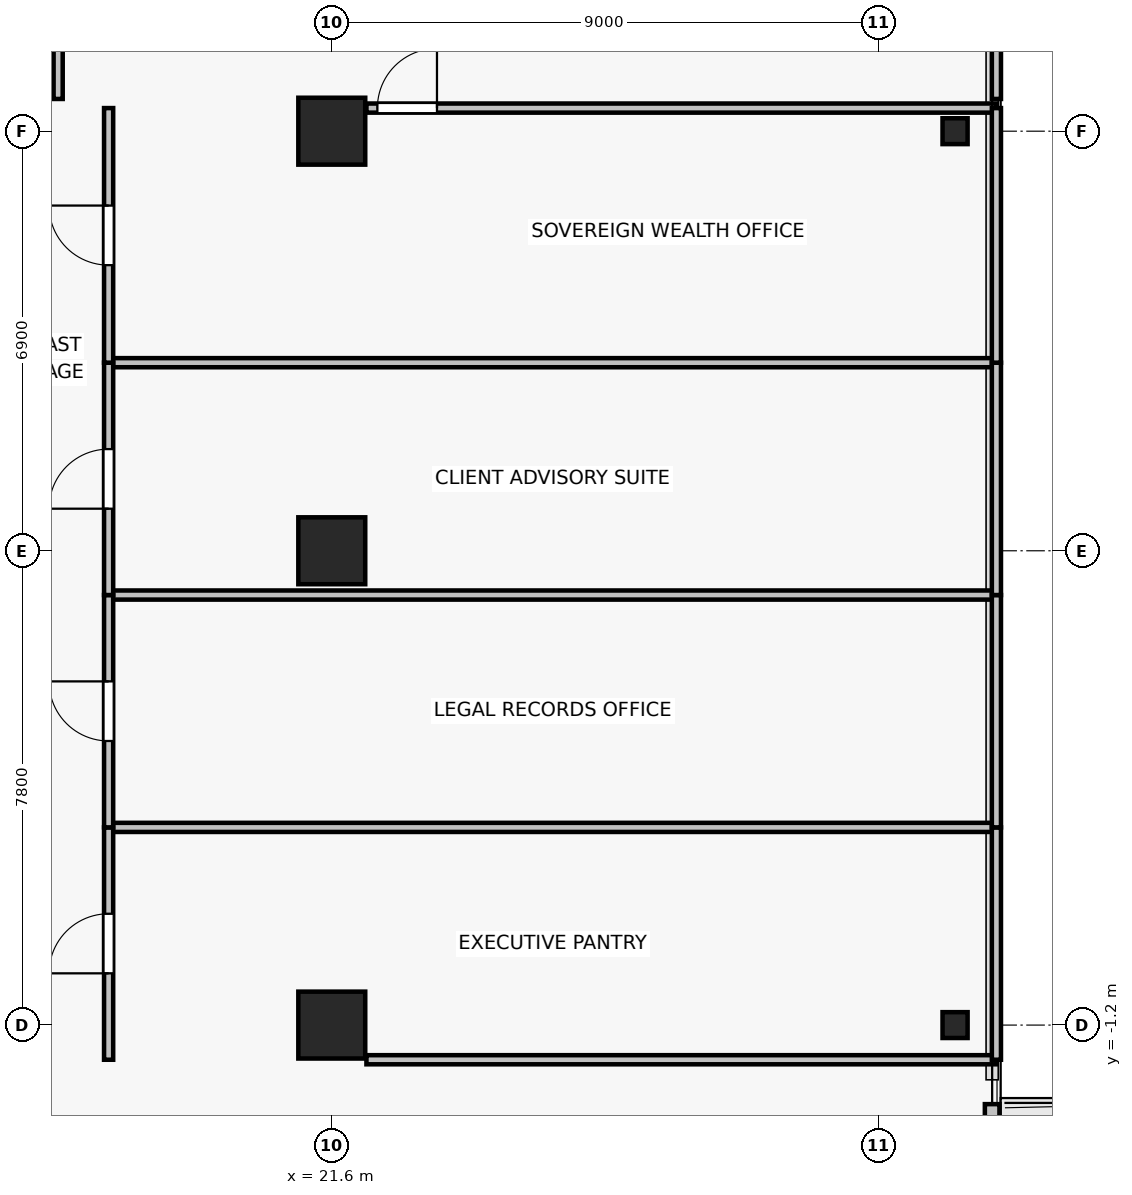
"""IFC4 building model, lengths in metres.
Left out: names, types, materials, properties, quantities, classifications, styles, units other than length and angle.
Written with IfcOpenShell. Run it as: python <this file> out.ifc"""

import sys

from ifc_helpers import new_model, si_unit, direction, frame, frame_2d, origin, origin_2d, place, context, subcontext, project, spatial, rectangle, i_section, extrude, source, transform, mapped, element, fill, save


model = new_model("IFC4")
c1 = context("Model", 3, precision=1e-05, world=origin(), true_north=direction((0.0, 1.0)))
c2 = subcontext(c1, "Body", "Model", "MODEL_VIEW")
j1 = project(units=[si_unit("LENGTHUNIT", "METRE"), si_unit("PLANEANGLEUNIT", "RADIAN")], contexts=[c1])
p1 = place(None, origin())
s1 = spatial("IfcSite", under=j1, at=p1, CompositionType="ELEMENT")
p2 = place(p1, origin())
s2 = spatial("IfcBuilding", under=s1, at=p2, CompositionType="ELEMENT")
p3 = place(p2, frame((0.0, 0.0, 76.9)))
s3 = spatial("IfcBuildingStorey", under=s2, at=p3, CompositionType="ELEMENT", Elevation=76.9)
for number, where, z_axis, x_axis in (
    (1, (21.6, -1.2, 0.0), (0.0, 0.0, 1.0), (1.0, 0.0, 0.0)),
    (2, (21.6, 6.6, 0.0), (0.0, 0.0, 1.0), (1.0, 0.0, 0.0)),
    (3, (21.6, 13.5, 0.0), (0.0, 0.0, 1.0), (1.0, 0.0, 0.0)),
):
    element("IfcColumn", number, at=place(p3, frame(where, z_axis=z_axis, x_axis=x_axis)), inside=s3, PredefinedType="COLUMN", context=c2, shape_type="SweptSolid", body=[
        extrude(rectangle(XDim=1.1, YDim=1.1, at=origin_2d()), origin(), (0.0, 0.0, 1.0), 3.3),
    ])
for number, where, z_axis, x_axis in (
    (4, (31.85, -1.2, 0.0), (0.0, 0.0, 1.0), (1.0, 0.0, 0.0)),
    (5, (31.85, 13.5, 0.0), (0.0, 0.0, 1.0), (1.0, 0.0, 0.0)),
):
    element("IfcColumn", number, at=place(p3, frame(where, z_axis=z_axis, x_axis=x_axis)), inside=s3, PredefinedType="COLUMN", context=c2, shape_type="SweptSolid", body=[
        extrude(i_section(OverallWidth=0.412, OverallDepth=0.425, WebThickness=0.026, FlangeThickness=0.039, FilletRadius=0.015, at=origin_2d()), origin(), (0.0, 0.0, 1.0), 3.3),
    ])
p4 = place(p3, frame((32.46, -2.5, 0.0), z_axis=(0.0, 0.0, 1.0), x_axis=(0.0, -1.0, 0.0)))
e6 = element("IfcWall", 6, at=p4, inside=s3, PredefinedType="SOLIDWALL", context=c2, shape_type="SweptSolid", body=[
    extrude(rectangle(XDim=5.8, YDim=0.24, at=frame_2d((2.9, 0.0))), origin(), (0.0, 0.0, 1.0), 3.05),
])
p5 = place(p4, frame((0.696, 0.0, 0.0)))
e7 = element("IfcOpeningElement", 7, at=p5, cuts=e6, PredefinedType="OPENING", context=c2, shape_type="SweptSolid", body=[
    extrude(rectangle(XDim=1.0, YDim=2.2, at=frame_2d((0.5, 1.1))), frame((0.0, 0.13, 0.0), z_axis=(0.0, -1.0, 0.0), x_axis=(1.0, 0.0, 0.0)), (0.0, 0.0, 1.0), 0.26),
])
p6 = place(p4, frame((2.046, 0.0, 0.85)))
e8 = element("IfcOpeningElement", 8, at=p6, cuts=e6, PredefinedType="OPENING", context=c2, shape_type="SweptSolid", body=[
    extrude(rectangle(XDim=1.5, YDim=1.6, at=frame_2d((0.75, 0.8))), frame((0.0, 0.13, 0.0), z_axis=(0.0, -1.0, 0.0), x_axis=(1.0, 0.0, 0.0)), (0.0, 0.0, 1.0), 0.26),
])
p7 = place(p3, frame((32.53, -1.77, 0.0), z_axis=(0.0, 0.0, 1.0), x_axis=(-1.0, 0.0, 0.0)))
e9 = element("IfcWall", 9, at=p7, inside=s3, PredefinedType="PARTITIONING", context=c2, shape_type="SweptSolid", body=[
    extrude(rectangle(XDim=10.36, YDim=0.15, at=frame_2d((5.18, 0.0))), origin(), (0.0, 0.0, 1.0), 2.44),
])
p8 = place(p3, frame((17.93, 2.051, 0.0), z_axis=(0.0, 0.0, 1.0), x_axis=(1.0, 0.0, 0.0)))
e10 = element("IfcWall", 10, at=p8, inside=s3, PredefinedType="PARTITIONING", context=c2, shape_type="SweptSolid", body=[
    extrude(rectangle(XDim=14.6, YDim=0.15, at=frame_2d((7.3, 0.0))), origin(), (0.0, 0.0, 1.0), 2.44),
])
p9 = place(p3, frame((17.93, -1.77, 0.0), z_axis=(0.0, 0.0, 1.0), x_axis=(0.0, 1.0, 0.0)))
e11 = element("IfcWall", 11, at=p9, inside=s3, PredefinedType="PARTITIONING", context=c2, shape_type="SweptSolid", body=[
    extrude(rectangle(XDim=3.821, YDim=0.15, at=frame_2d((1.911, 0.0))), origin(), (0.0, 0.0, 1.0), 2.44),
])
p10 = place(p9, frame((1.421, 0.0, 0.0)))
e12 = element("IfcOpeningElement", 12, at=p10, cuts=e11, PredefinedType="OPENING", context=c2, shape_type="SweptSolid", body=[
    extrude(rectangle(XDim=0.98, YDim=2.15, at=frame_2d((0.49, 1.075))), frame((0.0, 0.085, 0.0), z_axis=(0.0, -1.0, 0.0), x_axis=(1.0, 0.0, 0.0)), (0.0, 0.0, 1.0), 0.17),
])
p11 = place(p3, frame((32.53, 2.051, 0.0), z_axis=(0.0, 0.0, 1.0), x_axis=(0.0, -1.0, 0.0)))
e13 = element("IfcWall", 13, at=p11, inside=s3, PredefinedType="PARTITIONING", context=c2, shape_type="SweptSolid", body=[
    extrude(rectangle(XDim=3.821, YDim=0.15, at=frame_2d((1.911, 0.0))), origin(), (0.0, 0.0, 1.0), 3.05),
])
p12 = place(p3, frame((17.93, 5.872, 0.0), z_axis=(0.0, 0.0, 1.0), x_axis=(1.0, 0.0, 0.0)))
e14 = element("IfcWall", 14, at=p12, inside=s3, PredefinedType="PARTITIONING", context=c2, shape_type="SweptSolid", body=[
    extrude(rectangle(XDim=14.6, YDim=0.15, at=frame_2d((7.3, 0.0))), origin(), (0.0, 0.0, 1.0), 2.44),
])
p13 = place(p3, frame((17.93, 2.051, 0.0), z_axis=(0.0, 0.0, 1.0), x_axis=(0.0, 1.0, 0.0)))
e15 = element("IfcWall", 15, at=p13, inside=s3, PredefinedType="PARTITIONING", context=c2, shape_type="SweptSolid", body=[
    extrude(rectangle(XDim=3.821, YDim=0.15, at=frame_2d((1.911, 0.0))), origin(), (0.0, 0.0, 1.0), 3.05),
])
p14 = place(p13, frame((1.421, 0.0, 0.0)))
e16 = element("IfcOpeningElement", 16, at=p14, cuts=e15, PredefinedType="OPENING", context=c2, shape_type="SweptSolid", body=[
    extrude(rectangle(XDim=0.98, YDim=2.15, at=frame_2d((0.49, 1.075))), frame((0.0, 0.085, 0.0), z_axis=(0.0, -1.0, 0.0), x_axis=(1.0, 0.0, 0.0)), (0.0, 0.0, 1.0), 0.17),
])
p15 = place(p3, frame((32.53, 5.872, 0.0), z_axis=(0.0, 0.0, 1.0), x_axis=(0.0, -1.0, 0.0)))
e17 = element("IfcWall", 17, at=p15, inside=s3, PredefinedType="PARTITIONING", context=c2, shape_type="SweptSolid", body=[
    extrude(rectangle(XDim=3.821, YDim=0.15, at=frame_2d((1.911, 0.0))), origin(), (0.0, 0.0, 1.0), 3.05),
])
p16 = place(p3, frame((17.93, 9.693, 0.0), z_axis=(0.0, 0.0, 1.0), x_axis=(1.0, 0.0, 0.0)))
e18 = element("IfcWall", 18, at=p16, inside=s3, PredefinedType="PARTITIONING", context=c2, shape_type="SweptSolid", body=[
    extrude(rectangle(XDim=14.6, YDim=0.15, at=frame_2d((7.3, 0.0))), origin(), (0.0, 0.0, 1.0), 2.44),
])
p17 = place(p3, frame((17.93, 5.872, 0.0), z_axis=(0.0, 0.0, 1.0), x_axis=(0.0, 1.0, 0.0)))
e19 = element("IfcWall", 19, at=p17, inside=s3, PredefinedType="PARTITIONING", context=c2, shape_type="SweptSolid", body=[
    extrude(rectangle(XDim=3.821, YDim=0.15, at=frame_2d((1.911, 0.0))), origin(), (0.0, 0.0, 1.0), 2.44),
])
p18 = place(p17, frame((1.42, 0.0, 0.0)))
e20 = element("IfcOpeningElement", 20, at=p18, cuts=e19, PredefinedType="OPENING", context=c2, shape_type="SweptSolid", body=[
    extrude(rectangle(XDim=0.98, YDim=2.15, at=frame_2d((0.49, 1.075))), frame((0.0, 0.085, 0.0), z_axis=(0.0, -1.0, 0.0), x_axis=(1.0, 0.0, 0.0)), (0.0, 0.0, 1.0), 0.17),
])
p19 = place(p3, frame((32.53, 9.693, 0.0), z_axis=(0.0, 0.0, 1.0), x_axis=(0.0, -1.0, 0.0)))
e21 = element("IfcWall", 21, at=p19, inside=s3, PredefinedType="PARTITIONING", context=c2, shape_type="SweptSolid", body=[
    extrude(rectangle(XDim=3.821, YDim=0.15, at=frame_2d((1.911, 0.0))), origin(), (0.0, 0.0, 1.0), 3.05),
])
p20 = place(p3, frame((22.17, 13.88, 0.0), z_axis=(0.0, 0.0, 1.0), x_axis=(1.0, 0.0, 0.0)))
e22 = element("IfcWall", 22, at=p20, inside=s3, PredefinedType="PARTITIONING", context=c2, shape_type="SweptSolid", body=[
    extrude(rectangle(XDim=10.36, YDim=0.15, at=frame_2d((5.18, 0.0))), origin(), (0.0, 0.0, 1.0), 3.05),
])
p21 = place(p20, frame((0.18, 0.0, 0.0)))
e23 = element("IfcOpeningElement", 23, at=p21, cuts=e22, PredefinedType="OPENING", context=c2, shape_type="SweptSolid", body=[
    extrude(rectangle(XDim=0.98, YDim=2.15, at=frame_2d((0.49, 1.075))), frame((0.0, 0.085, 0.0), z_axis=(0.0, -1.0, 0.0), x_axis=(1.0, 0.0, 0.0)), (0.0, 0.0, 1.0), 0.17),
])
p22 = place(p3, frame((17.93, 9.693, 0.0), z_axis=(0.0, 0.0, 1.0), x_axis=(0.0, 1.0, 0.0)))
e24 = element("IfcWall", 24, at=p22, inside=s3, PredefinedType="PARTITIONING", context=c2, shape_type="SweptSolid", body=[
    extrude(rectangle(XDim=4.187, YDim=0.15, at=frame_2d((2.093, 0.0))), origin(), (0.0, 0.0, 1.0), 2.44),
])
p23 = place(p22, frame((1.604, 0.0, 0.0)))
e25 = element("IfcOpeningElement", 25, at=p23, cuts=e24, PredefinedType="OPENING", context=c2, shape_type="SweptSolid", body=[
    extrude(rectangle(XDim=0.98, YDim=2.15, at=frame_2d((0.49, 1.075))), frame((0.0, 0.085, 0.0), z_axis=(0.0, -1.0, 0.0), x_axis=(1.0, 0.0, 0.0)), (0.0, 0.0, 1.0), 0.17),
])
p24 = place(p3, frame((32.53, 13.88, 0.0), z_axis=(0.0, 0.0, 1.0), x_axis=(0.0, -1.0, 0.0)))
e26 = element("IfcWall", 26, at=p24, inside=s3, PredefinedType="PARTITIONING", context=c2, shape_type="SweptSolid", body=[
    extrude(rectangle(XDim=4.187, YDim=0.15, at=frame_2d((2.093, 0.0))), origin(), (0.0, 0.0, 1.0), 3.05),
])
p25 = place(p3, frame((17.1, 18.13, 0.0), z_axis=(0.0, 0.0, 1.0), x_axis=(0.0, -1.0, 0.0)))
e27 = element("IfcWall", 27, at=p25, inside=s3, PredefinedType="PARTITIONING", context=c2, shape_type="SweptSolid", body=[
    extrude(rectangle(XDim=4.1, YDim=0.15, at=frame_2d((2.05, 0.0))), origin(), (0.0, 0.0, 1.0), 2.44),
])
p26 = place(p3, frame((32.53, 18.13, 0.0), z_axis=(0.0, 0.0, 1.0), x_axis=(0.0, -1.0, 0.0)))
e28 = element("IfcWall", 28, at=p26, inside=s3, PredefinedType="PARTITIONING", context=c2, shape_type="SweptSolid", body=[
    extrude(rectangle(XDim=4.1, YDim=0.15, at=frame_2d((2.05, 0.0))), origin(), (0.0, 0.0, 1.0), 3.05),
])
m1 = source(origin(), c2, "Body", "SweptSolid", [
    extrude(rectangle(XDim=0.98, YDim=2.15, at=frame_2d((0.49, 1.075))), frame((0.0, 0.025, 0.0), z_axis=(0.0, -1.0, 0.0), x_axis=(1.0, 0.0, 0.0)), (0.0, 0.0, 1.0), 0.05),
])
p27 = place(p10, origin())
e29 = element("IfcDoor", 29, at=p27, inside=s3, OperationType="SINGLE_SWING_LEFT", PredefinedType="DOOR", context=c2, shape_type="MappedRepresentation", body=[
    mapped(m1, transform((0.0, 0.0, 0.0), x_axis=(1.0, 0.0, 0.0), y_axis=(0.0, 1.0, 0.0), z_axis=(0.0, 0.0, 1.0), scale=1.0)),
])
fill(e12, e29)
p28 = place(p14, origin())
e30 = element("IfcDoor", 30, at=p28, inside=s3, OperationType="SINGLE_SWING_RIGHT", PredefinedType="DOOR", context=c2, shape_type="MappedRepresentation", body=[
    mapped(m1, transform((0.0, 0.0, 0.0), x_axis=(1.0, 0.0, 0.0), y_axis=(0.0, 1.0, 0.0), z_axis=(0.0, 0.0, 1.0), scale=1.0)),
])
fill(e16, e30)
p29 = place(p18, origin())
e31 = element("IfcDoor", 31, at=p29, inside=s3, OperationType="SINGLE_SWING_LEFT", PredefinedType="DOOR", context=c2, shape_type="MappedRepresentation", body=[
    mapped(m1, transform((0.0, 0.0, 0.0), x_axis=(1.0, 0.0, 0.0), y_axis=(0.0, 1.0, 0.0), z_axis=(0.0, 0.0, 1.0), scale=1.0)),
])
fill(e20, e31)
p30 = place(p23, origin())
e32 = element("IfcDoor", 32, at=p30, inside=s3, OperationType="SINGLE_SWING_RIGHT", PredefinedType="DOOR", context=c2, shape_type="MappedRepresentation", body=[
    mapped(m1, transform((0.0, 0.0, 0.0), x_axis=(1.0, 0.0, 0.0), y_axis=(0.0, 1.0, 0.0), z_axis=(0.0, 0.0, 1.0), scale=1.0)),
])
fill(e25, e32)
p31 = place(p21, origin())
e33 = element("IfcDoor", 33, at=p31, inside=s3, OperationType="SINGLE_SWING_RIGHT", PredefinedType="DOOR", context=c2, shape_type="MappedRepresentation", body=[
    mapped(m1, transform((0.0, 0.0, 0.0), x_axis=(1.0, 0.0, 0.0), y_axis=(0.0, 1.0, 0.0), z_axis=(0.0, 0.0, 1.0), scale=1.0)),
])
fill(e23, e33)
save(model, sys.argv[1])
